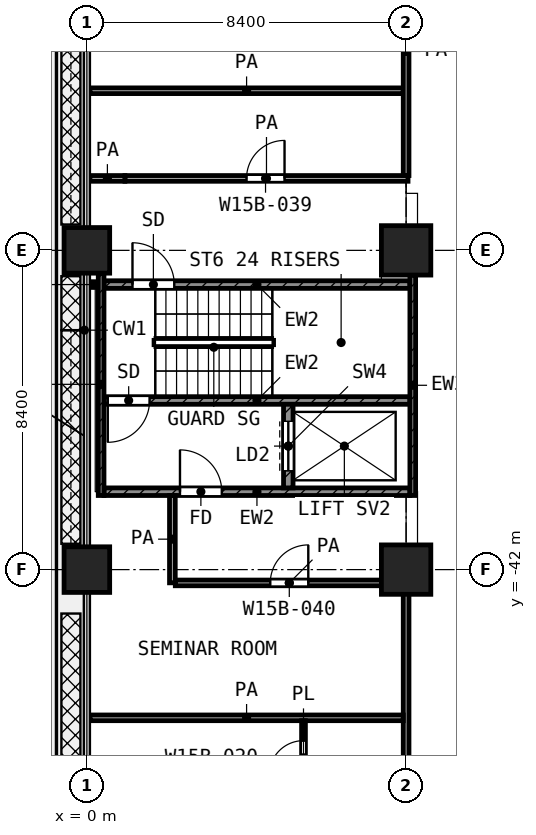
"""IFC4 building model, lengths in metres.
Left out: names, types, materials, properties, quantities, classifications, styles, units other than length and angle.
Written with IfcOpenShell. Run it as: python <this file> out.ifc"""

import sys

from ifc_helpers import new_model, si_unit, direction, frame, frame_2d, origin, origin_2d, place, context, subcontext, project, spatial, rectangle, extrude, element, fill, save


model = new_model("IFC4")
c1 = context("Model", 3, precision=1e-05, world=origin(), true_north=direction((0.0, 1.0)))
c2 = subcontext(c1, "Body", "Model", "MODEL_VIEW")
j1 = project(units=[si_unit("LENGTHUNIT", "METRE"), si_unit("PLANEANGLEUNIT", "RADIAN")], contexts=[c1])
p1 = place(None, origin())
s1 = spatial("IfcSite", under=j1, at=p1, CompositionType="ELEMENT")
p2 = place(p1, origin())
s2 = spatial("IfcBuilding", under=s1, at=p2, CompositionType="ELEMENT")
p3 = place(p2, frame((0.0, 0.0, 85.4)))
s3 = spatial("IfcBuildingStorey", under=s2, at=p3, CompositionType="ELEMENT", Elevation=85.4)
p4 = place(p3, frame((0.0, -33.6, 0.0), z_axis=(0.0, 0.0, 1.0), x_axis=(1.0, 0.0, 0.0)))
e1 = element("IfcColumn", 1, at=p4, inside=s3, PredefinedType="COLUMN", context=c2, shape_type="SweptSolid", body=[
    extrude(rectangle(XDim=1.2, YDim=1.2, at=origin_2d()), origin(), (0.0, 0.0, 1.0), 4.2),
])
p5 = place(p3, frame((8.4, -33.6, 0.0), z_axis=(0.0, 0.0, 1.0), x_axis=(1.0, 0.0, 0.0)))
e2 = element("IfcColumn", 2, at=p5, inside=s3, PredefinedType="COLUMN", context=c2, shape_type="SweptSolid", body=[
    extrude(rectangle(XDim=1.3, YDim=1.3, at=origin_2d()), origin(), (0.0, 0.0, 1.0), 4.2),
])
p6 = place(p3, frame((0.0, -42.0, 0.0), z_axis=(0.0, 0.0, 1.0), x_axis=(1.0, 0.0, 0.0)))
e3 = element("IfcColumn", 3, at=p6, inside=s3, PredefinedType="COLUMN", context=c2, shape_type="SweptSolid", body=[
    extrude(rectangle(XDim=1.2, YDim=1.2, at=origin_2d()), origin(), (0.0, 0.0, 1.0), 4.2),
])
p7 = place(p3, frame((8.4, -42.0, 0.0), z_axis=(0.0, 0.0, 1.0), x_axis=(1.0, 0.0, 0.0)))
e4 = element("IfcColumn", 4, at=p7, inside=s3, PredefinedType="COLUMN", context=c2, shape_type="SweptSolid", body=[
    extrude(rectangle(XDim=1.3, YDim=1.3, at=origin_2d()), origin(), (0.0, 0.0, 1.0), 4.2),
])
p8 = place(p3, frame((0.375, -40.05, 0.0), z_axis=(0.0, 0.0, 1.0), x_axis=(0.0, 1.0, 0.0)))
e5 = element("IfcWall", 5, at=p8, inside=s3, PredefinedType="SHEAR", context=c2, shape_type="SweptSolid", body=[
    extrude(rectangle(XDim=5.85, YDim=0.15, at=frame_2d((2.925, 0.0))), origin(), (0.0, 0.0, 1.0), 3.9),
])
p9 = place(p3, frame((8.575, -40.05, 0.0), z_axis=(0.0, 0.0, 1.0), x_axis=(0.0, 1.0, 0.0)))
e6 = element("IfcWall", 6, at=p9, inside=s3, PredefinedType="SHEAR", context=c2, shape_type="SweptSolid", body=[
    extrude(rectangle(XDim=5.8, YDim=0.15, at=frame_2d((2.9, 0.0))), origin(), (0.0, 0.0, 1.0), 3.9),
])
p10 = place(p3, frame((0.45, -34.5, 0.0), z_axis=(0.0, 0.0, 1.0), x_axis=(1.0, 0.0, 0.0)))
e7 = element("IfcWall", 7, at=p10, inside=s3, PredefinedType="SHEAR", context=c2, shape_type="SweptSolid", body=[
    extrude(rectangle(XDim=8.05, YDim=0.2, at=frame_2d((4.025, 0.0))), origin(), (0.0, 0.0, 1.0), 3.9),
])
p11 = place(p10, frame((0.75, 0.0, 0.0)))
e8 = element("IfcOpeningElement", 8, at=p11, cuts=e7, PredefinedType="OPENING", context=c2, shape_type="SweptSolid", body=[
    extrude(rectangle(XDim=1.1, YDim=2.1, at=frame_2d((0.55, 1.05))), frame((0.0, 0.11, 0.0), z_axis=(0.0, -1.0, 0.0), x_axis=(1.0, 0.0, 0.0)), (0.0, 0.0, 1.0), 0.22),
])
p12 = place(p3, frame((0.45, -37.55, 0.0), z_axis=(0.0, 0.0, 1.0), x_axis=(1.0, 0.0, 0.0)))
e9 = element("IfcWall", 9, at=p12, inside=s3, PredefinedType="SHEAR", context=c2, shape_type="SweptSolid", body=[
    extrude(rectangle(XDim=8.05, YDim=0.2, at=frame_2d((4.025, 0.0))), origin(), (0.0, 0.0, 1.0), 3.9),
])
p13 = place(p12, frame((0.1, 0.0, 0.0)))
e10 = element("IfcOpeningElement", 10, at=p13, cuts=e9, PredefinedType="OPENING", context=c2, shape_type="SweptSolid", body=[
    extrude(rectangle(XDim=1.1, YDim=2.1, at=frame_2d((0.55, 1.05))), frame((0.0, 0.11, 0.0), z_axis=(0.0, -1.0, 0.0), x_axis=(1.0, 0.0, 0.0)), (0.0, 0.0, 1.0), 0.22),
])
p14 = place(p3, frame((0.45, -39.95, 0.0), z_axis=(0.0, 0.0, 1.0), x_axis=(1.0, 0.0, 0.0)))
e11 = element("IfcWall", 11, at=p14, inside=s3, PredefinedType="SHEAR", context=c2, shape_type="SweptSolid", body=[
    extrude(rectangle(XDim=8.05, YDim=0.2, at=frame_2d((4.025, 0.0))), origin(), (0.0, 0.0, 1.0), 3.9),
])
p15 = place(p14, frame((2.0, 0.0, 0.0)))
e12 = element("IfcOpeningElement", 12, at=p15, cuts=e11, PredefinedType="OPENING", context=c2, shape_type="SweptSolid", body=[
    extrude(rectangle(XDim=1.1, YDim=2.1, at=frame_2d((0.55, 1.05))), frame((0.0, 0.11, 0.0), z_axis=(0.0, -1.0, 0.0), x_axis=(1.0, 0.0, 0.0)), (0.0, 0.0, 1.0), 0.22),
])
p16 = place(p3, frame((5.3, -39.85, 0.0), z_axis=(0.0, 0.0, 1.0), x_axis=(0.0, 1.0, 0.0)))
e13 = element("IfcWall", 13, at=p16, inside=s3, PredefinedType="SHEAR", context=c2, shape_type="SweptSolid", body=[
    extrude(rectangle(XDim=2.2, YDim=0.25, at=frame_2d((1.1, 0.0))), origin(), (0.0, 0.0, 1.0), 3.9),
])
p17 = place(p16, frame((0.45, 0.0, 0.0)))
e14 = element("IfcOpeningElement", 14, at=p17, cuts=e13, PredefinedType="OPENING", context=c2, shape_type="SweptSolid", body=[
    extrude(rectangle(XDim=1.3, YDim=2.1, at=frame_2d((0.65, 1.05))), frame((0.0, 0.135, 0.0), z_axis=(0.0, -1.0, 0.0), x_axis=(1.0, 0.0, 0.0)), (0.0, 0.0, 1.0), 0.27),
])
p18 = place(p3, frame((5.7, -48.0, 0.0), z_axis=(0.0, 0.0, 1.0), x_axis=(0.0, 1.0, 0.0)))
e15 = element("IfcWall", 15, at=p18, inside=s3, PredefinedType="PARTITIONING", context=c2, shape_type="SweptSolid", body=[
    extrude(rectangle(XDim=2.025, YDim=0.1, at=frame_2d((1.012, 0.0))), origin(), (0.0, 0.0, 1.0), 3.9),
])
p19 = place(p18, frame((0.6, 0.0, 0.0)))
e16 = element("IfcOpeningElement", 16, at=p19, cuts=e15, PredefinedType="OPENING", context=c2, shape_type="SweptSolid", body=[
    extrude(rectangle(XDim=0.9, YDim=2.1, at=frame_2d((0.45, 1.05))), frame((0.0, 0.06, 0.0), z_axis=(0.0, -1.0, 0.0), x_axis=(1.0, 0.0, 0.0)), (0.0, 0.0, 1.0), 0.12),
])
p20 = place(p3, frame((0.08, -45.9, 0.0), z_axis=(0.0, 0.0, 1.0), x_axis=(1.0, 0.0, 0.0)))
e17 = element("IfcWall", 17, at=p20, inside=s3, PredefinedType="PARTITIONING", context=c2, shape_type="SweptSolid", body=[
    extrude(rectangle(XDim=8.245, YDim=0.15, at=frame_2d((4.123, 0.0))), origin(), (0.0, 0.0, 1.0), 3.9),
])
p21 = place(p3, frame((2.327, -42.35, 0.0), z_axis=(0.0, 0.0, 1.0), x_axis=(1.0, 0.0, 0.0)))
e18 = element("IfcWall", 18, at=p21, inside=s3, PredefinedType="PARTITIONING", context=c2, shape_type="SweptSolid", body=[
    extrude(rectangle(XDim=5.998, YDim=0.15, at=frame_2d((2.999, 0.0))), origin(), (0.0, 0.0, 1.0), 3.9),
])
p22 = place(p21, frame((2.499, 0.0, 0.0)))
e19 = element("IfcOpeningElement", 19, at=p22, cuts=e18, PredefinedType="OPENING", context=c2, shape_type="SweptSolid", body=[
    extrude(rectangle(XDim=1.0, YDim=2.1, at=frame_2d((0.5, 1.05))), frame((0.0, 0.085, 0.0), z_axis=(0.0, -1.0, 0.0), x_axis=(1.0, 0.0, 0.0)), (0.0, 0.0, 1.0), 0.17),
])
p23 = place(p3, frame((0.08, -34.5, 0.0), z_axis=(0.0, 0.0, 1.0), x_axis=(1.0, 0.0, 0.0)))
e20 = element("IfcWall", 20, at=p23, inside=s3, PredefinedType="PARTITIONING", context=c2, shape_type="SweptSolid", body=[
    extrude(rectangle(XDim=0.19, YDim=0.15, at=frame_2d((0.095, 0.0))), origin(), (0.0, 0.0, 1.0), 3.9),
])
p24 = place(p3, frame((0.08, -31.707, 0.0), z_axis=(0.0, 0.0, 1.0), x_axis=(1.0, 0.0, 0.0)))
e21 = element("IfcWall", 21, at=p24, inside=s3, PredefinedType="PARTITIONING", context=c2, shape_type="SweptSolid", body=[
    extrude(rectangle(XDim=0.92, YDim=0.15, at=frame_2d((0.46, 0.0))), origin(), (0.0, 0.0, 1.0), 3.9),
])
p25 = place(p3, frame((1.002, -31.707, 0.0), z_axis=(0.0, 0.0, 1.0), x_axis=(1.0, 0.0, 0.0)))
e22 = element("IfcWall", 22, at=p25, inside=s3, PredefinedType="PARTITIONING", context=c2, shape_type="SweptSolid", body=[
    extrude(rectangle(XDim=7.448, YDim=0.15, at=frame_2d((3.724, 0.0))), origin(), (0.0, 0.0, 1.0), 3.9),
])
p26 = place(p25, frame((3.199, 0.0, 0.0)))
e23 = element("IfcOpeningElement", 23, at=p26, cuts=e22, PredefinedType="OPENING", context=c2, shape_type="SweptSolid", body=[
    extrude(rectangle(XDim=1.0, YDim=2.1, at=frame_2d((0.5, 1.05))), frame((0.0, 0.085, 0.0), z_axis=(0.0, -1.0, 0.0), x_axis=(1.0, 0.0, 0.0)), (0.0, 0.0, 1.0), 0.17),
])
p27 = place(p3, frame((0.08, -29.4, 0.0), z_axis=(0.0, 0.0, 1.0), x_axis=(1.0, 0.0, 0.0)))
e24 = element("IfcWall", 24, at=p27, inside=s3, PredefinedType="PARTITIONING", context=c2, shape_type="SweptSolid", body=[
    extrude(rectangle(XDim=8.245, YDim=0.15, at=frame_2d((4.123, 0.0))), origin(), (0.0, 0.0, 1.0), 3.9),
])
p28 = place(p3, frame((2.25, -42.348, 0.0), z_axis=(0.0, 0.0, 1.0), x_axis=(0.0, 1.0, 0.0)))
e25 = element("IfcWall", 25, at=p28, inside=s3, PredefinedType="PARTITIONING", context=c2, shape_type="SweptSolid", body=[
    extrude(rectangle(XDim=2.298, YDim=0.15, at=frame_2d((1.149, 0.0))), origin(), (0.0, 0.0, 1.0), 3.9),
])
p29 = place(p3, frame((8.4, -71.32, 0.0), z_axis=(0.0, 0.0, 1.0), x_axis=(0.0, 1.0, 0.0)))
e26 = element("IfcWall", 26, at=p29, inside=s3, PredefinedType="PARTITIONING", context=c2, shape_type="SweptSolid", body=[
    extrude(rectangle(XDim=28.97, YDim=0.15, at=frame_2d((14.485, 0.0))), origin(), (0.0, 0.0, 1.0), 3.9),
])
p30 = place(p29, frame((21.62, 0.0, 0.0)))
e27 = element("IfcOpeningElement", 27, at=p30, cuts=e26, PredefinedType="OPENING", context=c2, shape_type="SweptSolid", body=[
    extrude(rectangle(XDim=1.2, YDim=2.1, at=frame_2d((0.6, 1.05))), frame((0.0, 0.085, 0.0), z_axis=(0.0, -1.0, 0.0), x_axis=(1.0, 0.0, 0.0)), (0.0, 0.0, 1.0), 0.17),
])
p31 = place(p29, frame((18.72, 0.0, 0.0)))
e28 = element("IfcOpeningElement", 28, at=p31, cuts=e26, PredefinedType="OPENING", context=c2, shape_type="SweptSolid", body=[
    extrude(rectangle(XDim=1.2, YDim=2.1, at=frame_2d((0.6, 1.05))), frame((0.0, 0.085, 0.0), z_axis=(0.0, -1.0, 0.0), x_axis=(1.0, 0.0, 0.0)), (0.0, 0.0, 1.0), 0.17),
])
p32 = place(p29, frame((10.12, 0.0, 0.0)))
e29 = element("IfcOpeningElement", 29, at=p32, cuts=e26, PredefinedType="OPENING", context=c2, shape_type="SweptSolid", body=[
    extrude(rectangle(XDim=1.2, YDim=2.1, at=frame_2d((0.6, 1.05))), frame((0.0, 0.085, 0.0), z_axis=(0.0, -1.0, 0.0), x_axis=(1.0, 0.0, 0.0)), (0.0, 0.0, 1.0), 0.17),
])
p33 = place(p29, frame((13.22, 0.0, 0.0)))
e30 = element("IfcOpeningElement", 30, at=p33, cuts=e26, PredefinedType="OPENING", context=c2, shape_type="SweptSolid", body=[
    extrude(rectangle(XDim=0.9, YDim=2.1, at=frame_2d((0.45, 1.05))), frame((0.0, 0.085, 0.0), z_axis=(0.0, -1.0, 0.0), x_axis=(1.0, 0.0, 0.0)), (0.0, 0.0, 1.0), 0.17),
])
p34 = place(p29, frame((4.87, 0.0, 0.0)))
e31 = element("IfcOpeningElement", 31, at=p34, cuts=e26, PredefinedType="OPENING", context=c2, shape_type="SweptSolid", body=[
    extrude(rectangle(XDim=1.5, YDim=2.1, at=frame_2d((0.75, 1.05))), frame((0.0, 0.085, 0.0), z_axis=(0.0, -1.0, 0.0), x_axis=(1.0, 0.0, 0.0)), (0.0, 0.0, 1.0), 0.17),
])
p35 = place(p3, frame((8.4, -31.632, 0.0), z_axis=(0.0, 0.0, 1.0), x_axis=(0.0, 1.0, 0.0)))
e32 = element("IfcWall", 32, at=p35, inside=s3, PredefinedType="PARTITIONING", context=c2, shape_type="SweptSolid", body=[
    extrude(rectangle(XDim=6.532, YDim=0.15, at=frame_2d((3.266, 0.0))), origin(), (0.0, 0.0, 1.0), 3.9),
])
p36 = place(p35, frame((3.832, 0.0, 0.0)))
e33 = element("IfcOpeningElement", 33, at=p36, cuts=e32, PredefinedType="OPENING", context=c2, shape_type="SweptSolid", body=[
    extrude(rectangle(XDim=1.0, YDim=2.1, at=frame_2d((0.5, 1.05))), frame((0.0, 0.085, 0.0), z_axis=(0.0, -1.0, 0.0), x_axis=(1.0, 0.0, 0.0)), (0.0, 0.0, 1.0), 0.17),
])
p37 = place(p11, origin())
e34 = element("IfcDoor", 34, at=p37, inside=s3, OperationType="SINGLE_SWING_LEFT", PredefinedType="DOOR", context=c2, shape_type="SweptSolid", body=[
    extrude(rectangle(XDim=1.1, YDim=2.1, at=frame_2d((0.55, 1.05))), frame((0.0, 0.025, 0.0), z_axis=(0.0, -1.0, 0.0), x_axis=(1.0, 0.0, 0.0)), (0.0, 0.0, 1.0), 0.05),
])
fill(e8, e34)
p38 = place(p13, frame((1.1, 0.0, 0.0), z_axis=(0.0, 0.0, 1.0), x_axis=(-1.0, 0.0, 0.0)))
e35 = element("IfcDoor", 35, at=p38, inside=s3, OperationType="SINGLE_SWING_LEFT", PredefinedType="DOOR", context=c2, shape_type="SweptSolid", body=[
    extrude(rectangle(XDim=1.1, YDim=2.1, at=frame_2d((0.55, 1.05))), frame((0.0, 0.025, 0.0), z_axis=(0.0, -1.0, 0.0), x_axis=(1.0, 0.0, 0.0)), (0.0, 0.0, 1.0), 0.05),
])
fill(e10, e35)
p39 = place(p17, origin())
e36 = element("IfcDoor", 36, at=p39, inside=s3, OperationType="DOUBLE_DOOR_SLIDING", PredefinedType="DOOR", context=c2, shape_type="SweptSolid", body=[
    extrude(rectangle(XDim=1.3, YDim=2.1, at=frame_2d((0.65, 1.05))), frame((0.0, 0.025, 0.0), z_axis=(0.0, -1.0, 0.0), x_axis=(1.0, 0.0, 0.0)), (0.0, 0.0, 1.0), 0.05),
])
fill(e14, e36)
p40 = place(p15, origin())
e37 = element("IfcDoor", 37, at=p40, inside=s3, OperationType="SINGLE_SWING_LEFT", PredefinedType="DOOR", context=c2, shape_type="SweptSolid", body=[
    extrude(rectangle(XDim=1.1, YDim=2.1, at=frame_2d((0.55, 1.05))), frame((0.0, 0.025, 0.0), z_axis=(0.0, -1.0, 0.0), x_axis=(1.0, 0.0, 0.0)), (0.0, 0.0, 1.0), 0.05),
])
fill(e12, e37)
p41 = place(p26, origin())
e38 = element("IfcDoor", 38, at=p41, inside=s3, OperationType="SINGLE_SWING_RIGHT", PredefinedType="DOOR", context=c2, shape_type="SweptSolid", body=[
    extrude(rectangle(XDim=1.0, YDim=2.1, at=frame_2d((0.5, 1.05))), frame((0.0, 0.025, 0.0), z_axis=(0.0, -1.0, 0.0), x_axis=(1.0, 0.0, 0.0)), (0.0, 0.0, 1.0), 0.05),
])
fill(e23, e38)
p42 = place(p22, origin())
e39 = element("IfcDoor", 39, at=p42, inside=s3, OperationType="SINGLE_SWING_RIGHT", PredefinedType="DOOR", context=c2, shape_type="SweptSolid", body=[
    extrude(rectangle(XDim=1.0, YDim=2.1, at=frame_2d((0.5, 1.05))), frame((0.0, 0.025, 0.0), z_axis=(0.0, -1.0, 0.0), x_axis=(1.0, 0.0, 0.0)), (0.0, 0.0, 1.0), 0.05),
])
fill(e19, e39)
p43 = place(p19, origin())
e40 = element("IfcDoor", 40, at=p43, inside=s3, OperationType="SINGLE_SWING_LEFT", PredefinedType="DOOR", context=c2, shape_type="SweptSolid", body=[
    extrude(rectangle(XDim=0.9, YDim=2.1, at=frame_2d((0.45, 1.05))), frame((0.0, 0.025, 0.0), z_axis=(0.0, -1.0, 0.0), x_axis=(1.0, 0.0, 0.0)), (0.0, 0.0, 1.0), 0.05),
])
fill(e16, e40)
save(model, sys.argv[1])
